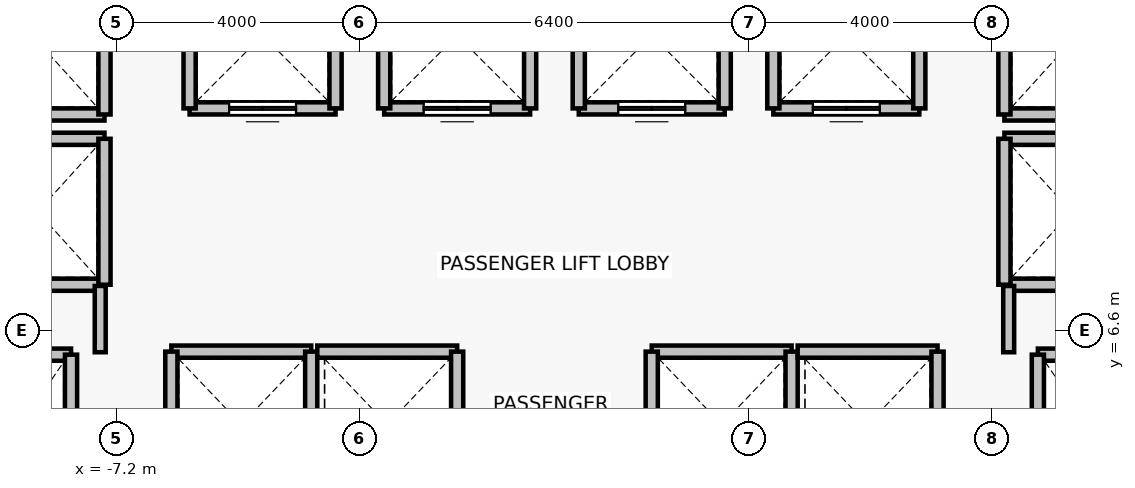
"""IFC4 building model, lengths in metres.
Left out: names, types, materials, properties, quantities, classifications, styles, units other than length and angle.
Written with IfcOpenShell. Run it as: python <this file> out.ifc"""

import sys

from ifc_helpers import new_model, si_unit, direction, frame, frame_2d, origin, place, context, subcontext, project, spatial, rectangle, extrude, source, transform, mapped, element, fill, save


model = new_model("IFC4")
c1 = context("Model", 3, precision=1e-05, world=origin(), true_north=direction((0.0, 1.0)))
c2 = subcontext(c1, "Body", "Model", "MODEL_VIEW")
j1 = project(units=[si_unit("LENGTHUNIT", "METRE"), si_unit("PLANEANGLEUNIT", "RADIAN")], contexts=[c1])
p1 = place(None, origin())
s1 = spatial("IfcSite", under=j1, at=p1, CompositionType="ELEMENT")
p2 = place(p1, origin())
s2 = spatial("IfcBuilding", under=s1, at=p2, CompositionType="ELEMENT")
p3 = place(p2, frame((0.0, 0.0, 18.2)))
s3 = spatial("IfcBuildingStorey", under=s2, at=p3, CompositionType="ELEMENT", Elevation=18.2)
p4 = place(p3, frame((-9.95, 6.2, 0.0), z_axis=(0.0, 0.0, 1.0), x_axis=(1.0, 0.0, 0.0)))
e1 = element("IfcWall", 1, at=p4, inside=s3, PredefinedType="SOLIDWALL", context=c2, shape_type="SweptSolid", body=[
    extrude(rectangle(XDim=2.0, YDim=0.2, at=frame_2d((1.0, 0.0))), origin(), (0.0, 0.0, 1.0), 4.1),
])
p5 = place(p3, frame((-7.95, 6.2, 0.0), z_axis=(0.0, 0.0, 1.0), x_axis=(0.0, -1.0, 0.0)))
e2 = element("IfcWall", 2, at=p5, inside=s3, PredefinedType="SOLIDWALL", context=c2, shape_type="SweptSolid", body=[
    extrude(rectangle(XDim=2.8, YDim=0.2, at=frame_2d((1.4, 0.0))), origin(), (0.0, 0.0, 1.0), 4.1),
])
p6 = place(p3, frame((7.95, 6.2, 0.0), z_axis=(0.0, 0.0, 1.0), x_axis=(1.0, 0.0, 0.0)))
e3 = element("IfcWall", 3, at=p6, inside=s3, PredefinedType="SOLIDWALL", context=c2, shape_type="SweptSolid", body=[
    extrude(rectangle(XDim=2.0, YDim=0.2, at=frame_2d((1.0, 0.0))), origin(), (0.0, 0.0, 1.0), 4.1),
])
p7 = place(p3, frame((7.95, 3.4, 0.0), z_axis=(0.0, 0.0, 1.0), x_axis=(0.0, 1.0, 0.0)))
e4 = element("IfcWall", 4, at=p7, inside=s3, PredefinedType="SOLIDWALL", context=c2, shape_type="SweptSolid", body=[
    extrude(rectangle(XDim=2.8, YDim=0.2, at=frame_2d((1.4, 0.0))), origin(), (0.0, 0.0, 1.0), 4.1),
])
p8 = place(p3, frame((-3.6, 10.25, 0.0), z_axis=(0.0, 0.0, 1.0), x_axis=(-1.0, 0.0, 0.0)))
e5 = element("IfcWall", 5, at=p8, inside=s3, PredefinedType="SOLIDWALL", context=c2, shape_type="SweptSolid", body=[
    extrude(rectangle(XDim=2.4, YDim=0.2, at=frame_2d((1.2, 0.0))), origin(), (0.0, 0.0, 1.0), 4.1),
])
p9 = place(p8, frame((0.65, 0.0, 0.0)))
e6 = element("IfcOpeningElement", 6, at=p9, cuts=e5, PredefinedType="OPENING", context=c2, shape_type="SweptSolid", body=[
    extrude(rectangle(XDim=1.1, YDim=2.2, at=frame_2d((0.55, 1.1))), frame((0.0, 0.11, 0.0), z_axis=(0.0, -1.0, 0.0), x_axis=(1.0, 0.0, 0.0)), (0.0, 0.0, 1.0), 0.22),
])
for number, where, z_axis, x_axis in (
    (7, (-6.0, 10.25, 0.0), (0.0, 0.0, 1.0), (0.0, 1.0, 0.0)),
    (8, (-3.6, 12.65, 0.0), (0.0, 0.0, 1.0), (0.0, -1.0, 0.0)),
):
    element("IfcWall", number, at=place(p3, frame(where, z_axis=z_axis, x_axis=x_axis)), inside=s3, PredefinedType="SOLIDWALL", context=c2, shape_type="SweptSolid", body=[
        extrude(rectangle(XDim=2.4, YDim=0.2, at=frame_2d((1.2, 0.0))), origin(), (0.0, 0.0, 1.0), 4.1),
    ])
p10 = place(p3, frame((-0.4, 10.25, 0.0), z_axis=(0.0, 0.0, 1.0), x_axis=(-1.0, 0.0, 0.0)))
e9 = element("IfcWall", 9, at=p10, inside=s3, PredefinedType="SOLIDWALL", context=c2, shape_type="SweptSolid", body=[
    extrude(rectangle(XDim=2.4, YDim=0.2, at=frame_2d((1.2, 0.0))), origin(), (0.0, 0.0, 1.0), 4.1),
])
p11 = place(p10, frame((0.65, 0.0, 0.0)))
e10 = element("IfcOpeningElement", 10, at=p11, cuts=e9, PredefinedType="OPENING", context=c2, shape_type="SweptSolid", body=[
    extrude(rectangle(XDim=1.1, YDim=2.2, at=frame_2d((0.55, 1.1))), frame((0.0, 0.11, 0.0), z_axis=(0.0, -1.0, 0.0), x_axis=(1.0, 0.0, 0.0)), (0.0, 0.0, 1.0), 0.22),
])
for number, where, z_axis, x_axis in (
    (11, (-2.8, 10.25, 0.0), (0.0, 0.0, 1.0), (0.0, 1.0, 0.0)),
    (12, (-0.4, 12.65, 0.0), (0.0, 0.0, 1.0), (0.0, -1.0, 0.0)),
):
    element("IfcWall", number, at=place(p3, frame(where, z_axis=z_axis, x_axis=x_axis)), inside=s3, PredefinedType="SOLIDWALL", context=c2, shape_type="SweptSolid", body=[
        extrude(rectangle(XDim=2.4, YDim=0.2, at=frame_2d((1.2, 0.0))), origin(), (0.0, 0.0, 1.0), 4.1),
    ])
p12 = place(p3, frame((2.8, 10.25, 0.0), z_axis=(0.0, 0.0, 1.0), x_axis=(-1.0, 0.0, 0.0)))
e13 = element("IfcWall", 13, at=p12, inside=s3, PredefinedType="SOLIDWALL", context=c2, shape_type="SweptSolid", body=[
    extrude(rectangle(XDim=2.4, YDim=0.2, at=frame_2d((1.2, 0.0))), origin(), (0.0, 0.0, 1.0), 4.1),
])
p13 = place(p12, frame((0.65, 0.0, 0.0)))
e14 = element("IfcOpeningElement", 14, at=p13, cuts=e13, PredefinedType="OPENING", context=c2, shape_type="SweptSolid", body=[
    extrude(rectangle(XDim=1.1, YDim=2.2, at=frame_2d((0.55, 1.1))), frame((0.0, 0.11, 0.0), z_axis=(0.0, -1.0, 0.0), x_axis=(1.0, 0.0, 0.0)), (0.0, 0.0, 1.0), 0.22),
])
for number, where, z_axis, x_axis in (
    (15, (0.4, 10.25, 0.0), (0.0, 0.0, 1.0), (0.0, 1.0, 0.0)),
    (16, (2.8, 12.65, 0.0), (0.0, 0.0, 1.0), (0.0, -1.0, 0.0)),
):
    element("IfcWall", number, at=place(p3, frame(where, z_axis=z_axis, x_axis=x_axis)), inside=s3, PredefinedType="SOLIDWALL", context=c2, shape_type="SweptSolid", body=[
        extrude(rectangle(XDim=2.4, YDim=0.2, at=frame_2d((1.2, 0.0))), origin(), (0.0, 0.0, 1.0), 4.1),
    ])
p14 = place(p3, frame((6.0, 10.25, 0.0), z_axis=(0.0, 0.0, 1.0), x_axis=(-1.0, 0.0, 0.0)))
e17 = element("IfcWall", 17, at=p14, inside=s3, PredefinedType="SOLIDWALL", context=c2, shape_type="SweptSolid", body=[
    extrude(rectangle(XDim=2.4, YDim=0.2, at=frame_2d((1.2, 0.0))), origin(), (0.0, 0.0, 1.0), 4.1),
])
p15 = place(p14, frame((0.65, 0.0, 0.0)))
e18 = element("IfcOpeningElement", 18, at=p15, cuts=e17, PredefinedType="OPENING", context=c2, shape_type="SweptSolid", body=[
    extrude(rectangle(XDim=1.1, YDim=2.2, at=frame_2d((0.55, 1.1))), frame((0.0, 0.11, 0.0), z_axis=(0.0, -1.0, 0.0), x_axis=(1.0, 0.0, 0.0)), (0.0, 0.0, 1.0), 0.22),
])
for number, where, z_axis, x_axis in (
    (19, (3.6, 10.25, 0.0), (0.0, 0.0, 1.0), (0.0, 1.0, 0.0)),
    (20, (6.0, 12.65, 0.0), (0.0, 0.0, 1.0), (0.0, -1.0, 0.0)),
):
    element("IfcWall", number, at=place(p3, frame(where, z_axis=z_axis, x_axis=x_axis)), inside=s3, PredefinedType="SOLIDWALL", context=c2, shape_type="SweptSolid", body=[
        extrude(rectangle(XDim=2.4, YDim=0.2, at=frame_2d((1.2, 0.0))), origin(), (0.0, 0.0, 1.0), 4.1),
    ])
p16 = place(p3, frame((-6.3, 6.25, 0.0), z_axis=(0.0, 0.0, 1.0), x_axis=(1.0, 0.0, 0.0)))
e21 = element("IfcWall", 21, at=p16, inside=s3, PredefinedType="SOLIDWALL", context=c2, shape_type="SweptSolid", body=[
    extrude(rectangle(XDim=2.3, YDim=0.2, at=frame_2d((1.15, 0.0))), origin(), (0.0, 0.0, 1.0), 4.1),
])
for number, where, z_axis, x_axis in (
    (22, (-6.3, 3.85, 0.0), (0.0, 0.0, 1.0), (0.0, 1.0, 0.0)),
    (23, (-4.0, 6.25, 0.0), (0.0, 0.0, 1.0), (0.0, -1.0, 0.0)),
):
    element("IfcWall", number, at=place(p3, frame(where, z_axis=z_axis, x_axis=x_axis)), inside=s3, PredefinedType="SOLIDWALL", context=c2, shape_type="SweptSolid", body=[
        extrude(rectangle(XDim=2.4, YDim=0.2, at=frame_2d((1.2, 0.0))), origin(), (0.0, 0.0, 1.0), 4.1),
    ])
p17 = place(p3, frame((-3.9, 6.25, 0.0), z_axis=(0.0, 0.0, 1.0), x_axis=(1.0, 0.0, 0.0)))
e24 = element("IfcWall", 24, at=p17, inside=s3, PredefinedType="SOLIDWALL", context=c2, shape_type="SweptSolid", body=[
    extrude(rectangle(XDim=2.3, YDim=0.2, at=frame_2d((1.15, 0.0))), origin(), (0.0, 0.0, 1.0), 4.1),
])
p18 = place(p3, frame((-1.6, 6.25, 0.0), z_axis=(0.0, 0.0, 1.0), x_axis=(0.0, -1.0, 0.0)))
e25 = element("IfcWall", 25, at=p18, inside=s3, PredefinedType="SOLIDWALL", context=c2, shape_type="SweptSolid", body=[
    extrude(rectangle(XDim=2.4, YDim=0.2, at=frame_2d((1.2, 0.0))), origin(), (0.0, 0.0, 1.0), 4.1),
])
p19 = place(p3, frame((1.6, 6.25, 0.0), z_axis=(0.0, 0.0, 1.0), x_axis=(1.0, 0.0, 0.0)))
e26 = element("IfcWall", 26, at=p19, inside=s3, PredefinedType="SOLIDWALL", context=c2, shape_type="SweptSolid", body=[
    extrude(rectangle(XDim=2.3, YDim=0.2, at=frame_2d((1.15, 0.0))), origin(), (0.0, 0.0, 1.0), 4.1),
])
for number, where, z_axis, x_axis in (
    (27, (1.6, 3.85, 0.0), (0.0, 0.0, 1.0), (0.0, 1.0, 0.0)),
    (28, (3.9, 6.25, 0.0), (0.0, 0.0, 1.0), (0.0, -1.0, 0.0)),
):
    element("IfcWall", number, at=place(p3, frame(where, z_axis=z_axis, x_axis=x_axis)), inside=s3, PredefinedType="SOLIDWALL", context=c2, shape_type="SweptSolid", body=[
        extrude(rectangle(XDim=2.4, YDim=0.2, at=frame_2d((1.2, 0.0))), origin(), (0.0, 0.0, 1.0), 4.1),
    ])
p20 = place(p3, frame((4.0, 6.25, 0.0), z_axis=(0.0, 0.0, 1.0), x_axis=(1.0, 0.0, 0.0)))
e29 = element("IfcWall", 29, at=p20, inside=s3, PredefinedType="SOLIDWALL", context=c2, shape_type="SweptSolid", body=[
    extrude(rectangle(XDim=2.3, YDim=0.2, at=frame_2d((1.15, 0.0))), origin(), (0.0, 0.0, 1.0), 4.1),
])
p21 = place(p3, frame((6.3, 6.25, 0.0), z_axis=(0.0, 0.0, 1.0), x_axis=(0.0, -1.0, 0.0)))
e30 = element("IfcWall", 30, at=p21, inside=s3, PredefinedType="SOLIDWALL", context=c2, shape_type="SweptSolid", body=[
    extrude(rectangle(XDim=2.4, YDim=0.2, at=frame_2d((1.2, 0.0))), origin(), (0.0, 0.0, 1.0), 4.1),
])
for number, where, z_axis, x_axis in (
    (31, (-7.4, 7.35, 0.0), (0.0, 0.0, 1.0), (-1.0, 0.0, 0.0)),
    (32, (-9.6, 9.75, 0.0), (0.0, 0.0, 1.0), (1.0, 0.0, 0.0)),
):
    element("IfcWall", number, at=place(p3, frame(where, z_axis=z_axis, x_axis=x_axis)), inside=s3, PredefinedType="SOLIDWALL", context=c2, shape_type="SweptSolid", body=[
        extrude(rectangle(XDim=2.2, YDim=0.2, at=frame_2d((1.1, 0.0))), origin(), (0.0, 0.0, 1.0), 3.19),
    ])
p22 = place(p3, frame((-7.4, 9.75, 0.0), z_axis=(0.0, 0.0, 1.0), x_axis=(0.0, -1.0, 0.0)))
e33 = element("IfcWall", 33, at=p22, inside=s3, PredefinedType="SOLIDWALL", context=c2, shape_type="SweptSolid", body=[
    extrude(rectangle(XDim=2.4, YDim=0.2, at=frame_2d((1.2, 0.0))), origin(), (0.0, 0.0, 1.0), 3.19),
])
p23 = place(p3, frame((-7.4, 10.15, 0.0), z_axis=(0.0, 0.0, 1.0), x_axis=(-1.0, 0.0, 0.0)))
e34 = element("IfcWall", 34, at=p23, inside=s3, PredefinedType="SOLIDWALL", context=c2, shape_type="SweptSolid", body=[
    extrude(rectangle(XDim=2.2, YDim=0.2, at=frame_2d((1.1, 0.0))), origin(), (0.0, 0.0, 1.0), 3.19),
])
p24 = place(p3, frame((-7.4, 12.55, 0.0), z_axis=(0.0, 0.0, 1.0), x_axis=(0.0, -1.0, 0.0)))
e35 = element("IfcWall", 35, at=p24, inside=s3, PredefinedType="SOLIDWALL", context=c2, shape_type="SweptSolid", body=[
    extrude(rectangle(XDim=2.4, YDim=0.2, at=frame_2d((1.2, 0.0))), origin(), (0.0, 0.0, 1.0), 3.19),
])
for number, where, z_axis, x_axis in (
    (36, (9.6, 7.35, 0.0), (0.0, 0.0, 1.0), (-1.0, 0.0, 0.0)),
    (37, (7.4, 9.75, 0.0), (0.0, 0.0, 1.0), (1.0, 0.0, 0.0)),
):
    element("IfcWall", number, at=place(p3, frame(where, z_axis=z_axis, x_axis=x_axis)), inside=s3, PredefinedType="SOLIDWALL", context=c2, shape_type="SweptSolid", body=[
        extrude(rectangle(XDim=2.2, YDim=0.2, at=frame_2d((1.1, 0.0))), origin(), (0.0, 0.0, 1.0), 3.19),
    ])
p25 = place(p3, frame((7.4, 7.35, 0.0), z_axis=(0.0, 0.0, 1.0), x_axis=(0.0, 1.0, 0.0)))
e38 = element("IfcWall", 38, at=p25, inside=s3, PredefinedType="SOLIDWALL", context=c2, shape_type="SweptSolid", body=[
    extrude(rectangle(XDim=2.4, YDim=0.2, at=frame_2d((1.2, 0.0))), origin(), (0.0, 0.0, 1.0), 3.19),
])
p26 = place(p3, frame((9.6, 10.15, 0.0), z_axis=(0.0, 0.0, 1.0), x_axis=(-1.0, 0.0, 0.0)))
e39 = element("IfcWall", 39, at=p26, inside=s3, PredefinedType="SOLIDWALL", context=c2, shape_type="SweptSolid", body=[
    extrude(rectangle(XDim=2.2, YDim=0.2, at=frame_2d((1.1, 0.0))), origin(), (0.0, 0.0, 1.0), 3.19),
])
p27 = place(p3, frame((7.4, 10.15, 0.0), z_axis=(0.0, 0.0, 1.0), x_axis=(0.0, 1.0, 0.0)))
e40 = element("IfcWall", 40, at=p27, inside=s3, PredefinedType="SOLIDWALL", context=c2, shape_type="SweptSolid", body=[
    extrude(rectangle(XDim=2.4, YDim=0.2, at=frame_2d((1.2, 0.0))), origin(), (0.0, 0.0, 1.0), 3.19),
])
for number, where, z_axis, x_axis in (
    (41, (-7.47, 7.33, 0.0), (0.0, 0.0, 1.0), (0.0, -1.0, 0.0)),
    (42, (7.47, 6.24, 0.0), (0.0, 0.0, 1.0), (0.0, 1.0, 0.0)),
):
    element("IfcWall", number, at=place(p3, frame(where, z_axis=z_axis, x_axis=x_axis)), inside=s3, PredefinedType="PARTITIONING", context=c2, shape_type="SweptSolid", body=[
        extrude(rectangle(XDim=1.09, YDim=0.18, at=frame_2d((0.545, 0.0))), origin(), (0.0, 0.0, 1.0), 3.19),
    ])
m1 = source(origin(), c2, "Body", "SweptSolid", [
    extrude(rectangle(XDim=1.1, YDim=2.2, at=frame_2d((0.55, 1.1))), frame((0.0, 0.025, 0.0), z_axis=(0.0, -1.0, 0.0), x_axis=(1.0, 0.0, 0.0)), (0.0, 0.0, 1.0), 0.05),
])
p28 = place(p9, origin())
e43 = element("IfcDoor", 43, at=p28, inside=s3, OperationType="DOUBLE_DOOR_SLIDING", PredefinedType="DOOR", context=c2, shape_type="MappedRepresentation", body=[
    mapped(m1, transform((0.0, 0.0, 0.0), x_axis=(1.0, 0.0, 0.0), y_axis=(0.0, 1.0, 0.0), z_axis=(0.0, 0.0, 1.0), scale=1.0)),
])
fill(e6, e43)
p29 = place(p11, origin())
e44 = element("IfcDoor", 44, at=p29, inside=s3, OperationType="DOUBLE_DOOR_SLIDING", PredefinedType="DOOR", context=c2, shape_type="MappedRepresentation", body=[
    mapped(m1, transform((0.0, 0.0, 0.0), x_axis=(1.0, 0.0, 0.0), y_axis=(0.0, 1.0, 0.0), z_axis=(0.0, 0.0, 1.0), scale=1.0)),
])
fill(e10, e44)
p30 = place(p13, origin())
e45 = element("IfcDoor", 45, at=p30, inside=s3, OperationType="DOUBLE_DOOR_SLIDING", PredefinedType="DOOR", context=c2, shape_type="MappedRepresentation", body=[
    mapped(m1, transform((0.0, 0.0, 0.0), x_axis=(1.0, 0.0, 0.0), y_axis=(0.0, 1.0, 0.0), z_axis=(0.0, 0.0, 1.0), scale=1.0)),
])
fill(e14, e45)
p31 = place(p15, origin())
e46 = element("IfcDoor", 46, at=p31, inside=s3, OperationType="DOUBLE_DOOR_SLIDING", PredefinedType="DOOR", context=c2, shape_type="MappedRepresentation", body=[
    mapped(m1, transform((0.0, 0.0, 0.0), x_axis=(1.0, 0.0, 0.0), y_axis=(0.0, 1.0, 0.0), z_axis=(0.0, 0.0, 1.0), scale=1.0)),
])
fill(e18, e46)
save(model, sys.argv[1])
